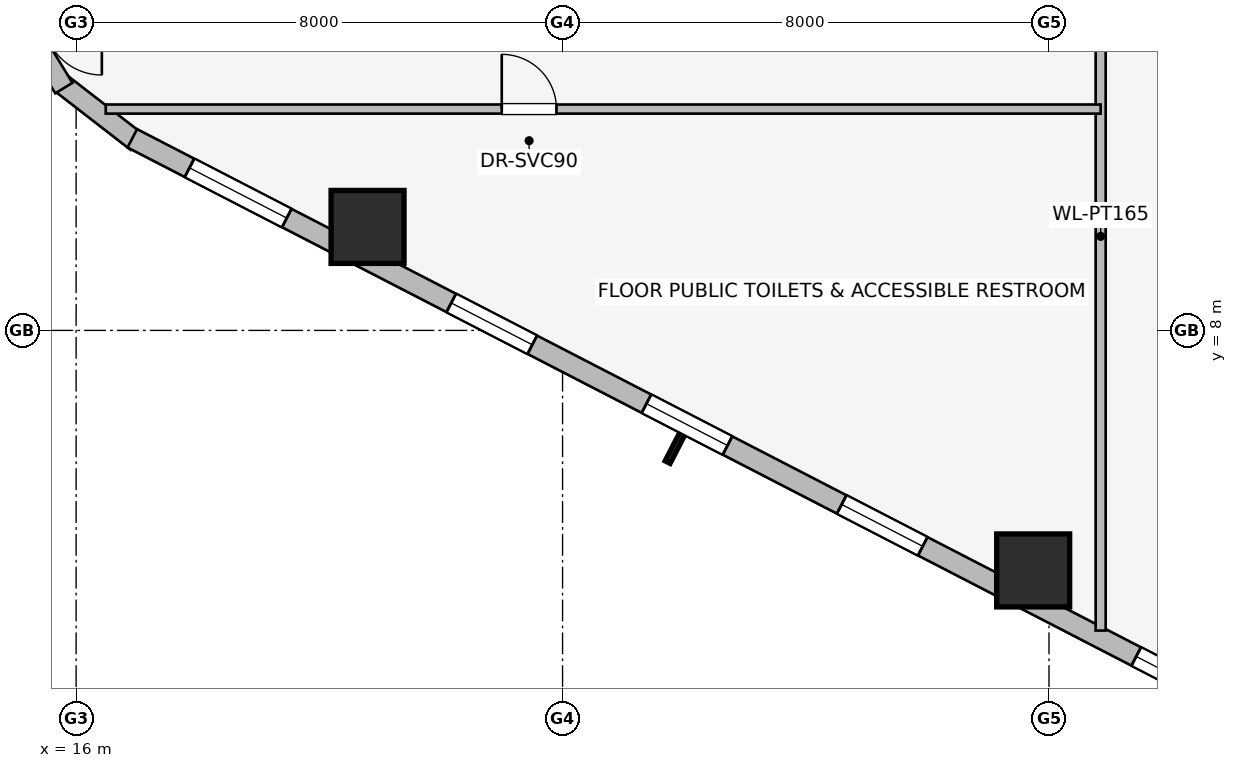
"""IFC4 building model, lengths in metres.
Left out: names, types, materials, properties, quantities, classifications, styles, units other than length and angle.
Written with IfcOpenShell. Run it as: python <this file> out.ifc"""

import sys

from ifc_helpers import new_model, si_unit, direction, frame, frame_2d, origin, origin_2d, place, context, subcontext, project, spatial, rectangle, extrude, element, fill, save


model = new_model("IFC4")
c1 = context("Model", 3, precision=1e-05, world=origin(), true_north=direction((0.0, 1.0)))
c2 = subcontext(c1, "Body", "Model", "MODEL_VIEW")
j1 = project(units=[si_unit("LENGTHUNIT", "METRE"), si_unit("PLANEANGLEUNIT", "RADIAN")], contexts=[c1])
p1 = place(None, origin())
s1 = spatial("IfcSite", under=j1, at=p1, CompositionType="ELEMENT")
p2 = place(p1, origin())
s2 = spatial("IfcBuilding", under=s1, at=p2, CompositionType="ELEMENT")
p3 = place(p2, frame((0.0, 0.0, 70.8)))
s3 = spatial("IfcBuildingStorey", under=s2, at=p3, CompositionType="ELEMENT", Elevation=70.8)
for number, where, z_axis, x_axis in (
    (1, (20.793, 9.702, 0.0), (0.0, 0.0, 1.0), (1.0, 0.0, 0.0)),
    (2, (31.74, 4.053, 0.0), (0.0, 0.0, 1.0), (1.0, 0.0, 0.0)),
):
    element("IfcColumn", number, at=place(p3, frame(where, z_axis=z_axis, x_axis=x_axis)), inside=s3, PredefinedType="COLUMN", context=c2, shape_type="SweptSolid", body=[
        extrude(rectangle(XDim=1.2, YDim=1.2, at=origin_2d()), origin(), (0.0, 0.0, 1.0), 3.65),
    ])
p4 = place(p3, frame((16.998, 11.099, 0.0), z_axis=(0.0, 0.0, 1.0), x_axis=(-0.790691856293, 0.61221433207, 0.0)))
e3 = element("IfcWall", 3, at=p4, inside=s3, PredefinedType="STANDARD", context=c2, shape_type="SweptSolid", body=[
    extrude(rectangle(XDim=1.676, YDim=0.33, at=frame_2d((0.838, 0.0))), origin(), (0.0, 0.0, 1.0), 3.39),
])
p5 = place(p3, frame((15.798, 11.985, 0.0), z_axis=(0.0, 0.0, 1.0), x_axis=(-0.520584129191, 0.853810379671, 0.0)))
e4 = element("IfcWall", 4, at=p5, inside=s3, PredefinedType="STANDARD", context=c2, shape_type="SweptSolid", body=[
    extrude(rectangle(XDim=1.677, YDim=0.33, at=frame_2d((0.838, 0.0))), origin(), (0.0, 0.0, 1.0), 3.39),
])
p6 = place(p3, frame((35.169, 1.743, 0.0), z_axis=(0.0, 0.0, 1.0), x_axis=(-0.888634413993, 0.458616264721, 0.0)))
e5 = element("IfcWall", 5, at=p6, inside=s3, PredefinedType="STANDARD", context=c2, shape_type="SweptSolid", body=[
    extrude(rectangle(XDim=20.531, YDim=0.34, at=frame_2d((10.266, 0.0))), origin(), (0.0, 0.0, 1.0), 2.684),
])
p7 = place(p6, frame((0.902, 0.0, 0.75)))
e6 = element("IfcOpeningElement", 6, at=p7, cuts=e5, PredefinedType="OPENING", context=c2, shape_type="SweptSolid", body=[
    extrude(rectangle(XDim=1.05, YDim=1.4, at=frame_2d((0.525, 0.7))), frame((0.0, 0.18, 0.0), z_axis=(0.0, -1.0, 0.0), x_axis=(1.0, 0.0, 0.0)), (0.0, 0.0, 1.0), 0.36),
])
p8 = place(p6, frame((5.903, 0.0, 0.75)))
e7 = element("IfcOpeningElement", 7, at=p8, cuts=e5, PredefinedType="OPENING", context=c2, shape_type="SweptSolid", body=[
    extrude(rectangle(XDim=1.5, YDim=1.5, at=frame_2d((0.75, 0.75))), frame((0.0, 0.18, 0.0), z_axis=(0.0, -1.0, 0.0), x_axis=(1.0, 0.0, 0.0)), (0.0, 0.0, 1.0), 0.36),
])
p9 = place(p6, frame((9.516, 0.0, 0.75)))
e8 = element("IfcOpeningElement", 8, at=p9, cuts=e5, PredefinedType="OPENING", context=c2, shape_type="SweptSolid", body=[
    extrude(rectangle(XDim=1.5, YDim=1.5, at=frame_2d((0.75, 0.75))), frame((0.0, 0.18, 0.0), z_axis=(0.0, -1.0, 0.0), x_axis=(1.0, 0.0, 0.0)), (0.0, 0.0, 1.0), 0.36),
])
p10 = place(p6, frame((13.129, 0.0, 0.75)))
e9 = element("IfcOpeningElement", 9, at=p10, cuts=e5, PredefinedType="OPENING", context=c2, shape_type="SweptSolid", body=[
    extrude(rectangle(XDim=1.5, YDim=1.5, at=frame_2d((0.75, 0.75))), frame((0.0, 0.18, 0.0), z_axis=(0.0, -1.0, 0.0), x_axis=(1.0, 0.0, 0.0)), (0.0, 0.0, 1.0), 0.36),
])
p11 = place(p6, frame((17.673, 0.0, 0.75)))
e10 = element("IfcOpeningElement", 10, at=p11, cuts=e5, PredefinedType="OPENING", context=c2, shape_type="SweptSolid", body=[
    extrude(rectangle(XDim=1.8, YDim=1.5, at=frame_2d((0.9, 0.75))), frame((0.0, 0.18, 0.0), z_axis=(0.0, -1.0, 0.0), x_axis=(1.0, 0.0, 0.0)), (0.0, 0.0, 1.0), 0.36),
])
p12 = place(p3, frame((32.85, 3.064, 0.0), z_axis=(0.0, 0.0, 1.0), x_axis=(0.0, 1.0, 0.0)))
e11 = element("IfcWall", 11, at=p12, inside=s3, PredefinedType="PARTITIONING", context=c2, shape_type="SweptSolid", body=[
    extrude(rectangle(XDim=12.966, YDim=0.165, at=frame_2d((6.483, 0.0))), origin(), (0.0, 0.0, 1.0), 3.39),
])
p13 = place(p3, frame((16.487, 11.64, 0.0), z_axis=(0.0, 0.0, 1.0), x_axis=(1.0, 0.0, 0.0)))
e12 = element("IfcWall", 12, at=p13, inside=s3, PredefinedType="PARTITIONING", context=c2, shape_type="SweptSolid", body=[
    extrude(rectangle(XDim=16.363, YDim=0.15, at=frame_2d((8.182, 0.0))), origin(), (0.0, 0.0, 1.0), 3.39),
])
p14 = place(p13, frame((6.513, 0.0, 0.0)))
e13 = element("IfcOpeningElement", 13, at=p14, cuts=e12, PredefinedType="OPENING", context=c2, shape_type="SweptSolid", body=[
    extrude(rectangle(XDim=0.9, YDim=2.0, at=frame_2d((0.45, 1.0))), frame((0.0, 0.085, 0.0), z_axis=(0.0, -1.0, 0.0), x_axis=(1.0, 0.0, 0.0)), (0.0, 0.0, 1.0), 0.17),
])
p15 = place(p7, origin())
e14 = element("IfcWindow", 14, at=p15, inside=s3, PartitioningType="SINGLE_PANEL", PredefinedType="WINDOW", context=c2, shape_type="SweptSolid", body=[
    extrude(rectangle(XDim=1.05, YDim=1.4, at=frame_2d((0.525, 0.7))), frame((0.0, 0.03, 0.0), z_axis=(0.0, -1.0, 0.0), x_axis=(1.0, 0.0, 0.0)), (0.0, 0.0, 1.0), 0.06),
])
fill(e6, e14)
p16 = place(p8, origin())
e15 = element("IfcWindow", 15, at=p16, inside=s3, PartitioningType="SINGLE_PANEL", PredefinedType="WINDOW", context=c2, shape_type="SweptSolid", body=[
    extrude(rectangle(XDim=1.5, YDim=1.5, at=frame_2d((0.75, 0.75))), frame((0.0, 0.03, 0.0), z_axis=(0.0, -1.0, 0.0), x_axis=(1.0, 0.0, 0.0)), (0.0, 0.0, 1.0), 0.06),
])
fill(e7, e15)
p17 = place(p9, origin())
e16 = element("IfcWindow", 16, at=p17, inside=s3, PartitioningType="SINGLE_PANEL", PredefinedType="WINDOW", context=c2, shape_type="SweptSolid", body=[
    extrude(rectangle(XDim=1.5, YDim=1.5, at=frame_2d((0.75, 0.75))), frame((0.0, 0.03, 0.0), z_axis=(0.0, -1.0, 0.0), x_axis=(1.0, 0.0, 0.0)), (0.0, 0.0, 1.0), 0.06),
])
fill(e8, e16)
p18 = place(p10, origin())
e17 = element("IfcWindow", 17, at=p18, inside=s3, PartitioningType="SINGLE_PANEL", PredefinedType="WINDOW", context=c2, shape_type="SweptSolid", body=[
    extrude(rectangle(XDim=1.5, YDim=1.5, at=frame_2d((0.75, 0.75))), frame((0.0, 0.03, 0.0), z_axis=(0.0, -1.0, 0.0), x_axis=(1.0, 0.0, 0.0)), (0.0, 0.0, 1.0), 0.06),
])
fill(e9, e17)
p19 = place(p11, origin())
e18 = element("IfcWindow", 18, at=p19, inside=s3, PartitioningType="SINGLE_PANEL", PredefinedType="WINDOW", context=c2, shape_type="SweptSolid", body=[
    extrude(rectangle(XDim=1.8, YDim=1.5, at=frame_2d((0.9, 0.75))), frame((0.0, 0.03, 0.0), z_axis=(0.0, -1.0, 0.0), x_axis=(1.0, 0.0, 0.0)), (0.0, 0.0, 1.0), 0.06),
])
fill(e10, e18)
p20 = place(p14, origin())
e19 = element("IfcDoor", 19, at=p20, inside=s3, OperationType="SINGLE_SWING_LEFT", PredefinedType="DOOR", context=c2, shape_type="SweptSolid", body=[
    extrude(rectangle(XDim=0.9, YDim=2.0, at=frame_2d((0.45, 1.0))), frame((0.0, 0.025, 0.0), z_axis=(0.0, -1.0, 0.0), x_axis=(1.0, 0.0, 0.0)), (0.0, 0.0, 1.0), 0.05),
])
fill(e13, e19)
save(model, sys.argv[1])
